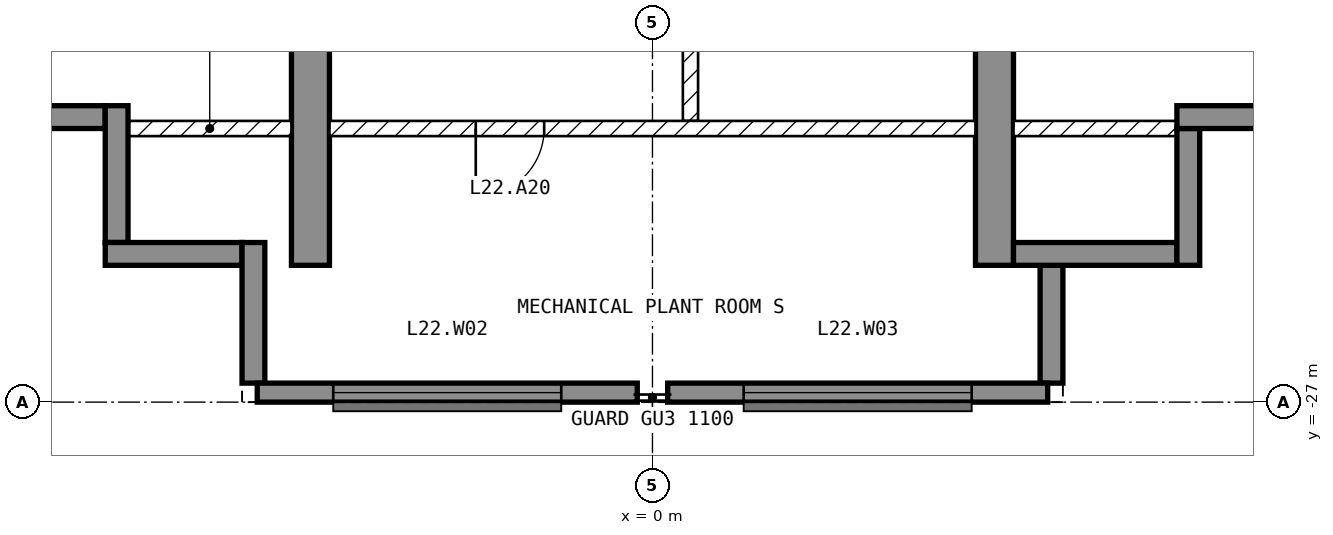
"""IFC4 building model, lengths in metres.
Left out: names, types, materials, properties, quantities, classifications, styles, units other than length and angle.
Written with IfcOpenShell. Run it as: python <this file> out.ifc"""

import sys

from ifc_helpers import new_model, si_unit, direction, frame, frame_2d, origin, place, context, subcontext, project, spatial, polyline, rectangle, outline, extrude, element, fill, save


model = new_model("IFC4")
c1 = context("Model", 3, precision=1e-05, world=origin(), true_north=direction((0.0, 1.0)))
c2 = subcontext(c1, "Body", "Model", "MODEL_VIEW")
j1 = project(units=[si_unit("LENGTHUNIT", "METRE"), si_unit("PLANEANGLEUNIT", "RADIAN")], contexts=[c1])
p1 = place(None, origin())
s1 = spatial("IfcSite", under=j1, at=p1, CompositionType="ELEMENT")
p2 = place(p1, origin())
s2 = spatial("IfcBuilding", under=s1, at=p2, CompositionType="ELEMENT")
p3 = place(p2, frame((0.0, 0.0, 97.9)))
s3 = spatial("IfcBuildingStorey", under=s2, at=p3, CompositionType="ELEMENT", Elevation=97.9)
for number, where, z_axis, x_axis in (
    (1, (-4.75, -25.2, -0.45), (1.0, 0.0, 0.0), (0.0, 1.0, 0.0)),
    (2, (4.25, -25.2, -0.45), (1.0, 0.0, 0.0), (0.0, 1.0, 0.0)),
):
    element("IfcWall", number, at=place(p3, frame(where, z_axis=z_axis, x_axis=x_axis)), inside=s3, PredefinedType="SHEAR", context=c2, shape_type="SweptSolid", body=[
        extrude(outline(polyline([(0.0, 0.0), (3.9, 0.0), (3.9, 2.85), (6.3, 2.85), (6.3, 0.0), (11.7, 0.0), (11.7, 2.85), (14.1, 2.85), (14.1, 0.0), (16.2, 0.0), (16.2, 4.7), (0.0, 4.7), (0.0, 0.0)])), origin(), (0.0, 0.0, 1.0), 0.5),
    ])
p4 = place(p3, frame((-5.2, -26.875, 0.0), z_axis=(0.0, 0.0, 1.0), x_axis=(1.0, 0.0, 0.0)))
e3 = element("IfcWall", 3, at=p4, inside=s3, PredefinedType="SOLIDWALL", context=c2, shape_type="SweptSolid", body=[
    extrude(rectangle(XDim=5.0, YDim=0.25, at=frame_2d((2.5, 0.0))), origin(), (0.0, 0.0, 1.0), 4.25),
])
p5 = place(p4, frame((1.0, 0.0, 1.0)))
e4 = element("IfcOpeningElement", 4, at=p5, cuts=e3, PredefinedType="OPENING", context=c2, shape_type="SweptSolid", body=[
    extrude(rectangle(XDim=3.0, YDim=2.4, at=frame_2d((1.5, 1.2))), frame((0.0, 0.135, 0.0), z_axis=(0.0, -1.0, 0.0), x_axis=(1.0, 0.0, 0.0)), (0.0, 0.0, 1.0), 0.27),
])
p6 = place(p3, frame((0.2, -26.875, 0.0), z_axis=(0.0, 0.0, 1.0), x_axis=(1.0, 0.0, 0.0)))
e5 = element("IfcWall", 5, at=p6, inside=s3, PredefinedType="SOLIDWALL", context=c2, shape_type="SweptSolid", body=[
    extrude(rectangle(XDim=5.0, YDim=0.25, at=frame_2d((2.5, 0.0))), origin(), (0.0, 0.0, 1.0), 4.25),
])
p7 = place(p6, frame((1.0, 0.0, 1.0)))
e6 = element("IfcOpeningElement", 6, at=p7, cuts=e5, PredefinedType="OPENING", context=c2, shape_type="SweptSolid", body=[
    extrude(rectangle(XDim=3.0, YDim=2.4, at=frame_2d((1.5, 1.2))), frame((0.0, 0.135, 0.0), z_axis=(0.0, -1.0, 0.0), x_axis=(1.0, 0.0, 0.0)), (0.0, 0.0, 1.0), 0.27),
])
p8 = place(p3, frame((5.25, -26.75, 0.0), z_axis=(0.0, 0.0, 1.0), x_axis=(0.0, 1.0, 0.0)))
e7 = element("IfcWall", 7, at=p8, inside=s3, PredefinedType="SOLIDWALL", context=c2, shape_type="SweptSolid", body=[
    extrude(rectangle(XDim=1.55, YDim=0.3, at=frame_2d((0.775, 0.0))), origin(), (0.0, 0.0, 1.0), 4.25),
])
p9 = place(p3, frame((4.75, -25.05, 0.0), z_axis=(0.0, 0.0, 1.0), x_axis=(1.0, 0.0, 0.0)))
e8 = element("IfcWall", 8, at=p9, inside=s3, PredefinedType="SOLIDWALL", context=c2, shape_type="SweptSolid", body=[
    extrude(rectangle(XDim=2.15, YDim=0.3, at=frame_2d((1.075, 0.0))), origin(), (0.0, 0.0, 1.0), 4.25),
])
p10 = place(p3, frame((7.05, -25.2, 0.0), z_axis=(0.0, 0.0, 1.0), x_axis=(0.0, 1.0, 0.0)))
e9 = element("IfcWall", 9, at=p10, inside=s3, PredefinedType="SOLIDWALL", context=c2, shape_type="SweptSolid", body=[
    extrude(rectangle(XDim=1.8, YDim=0.3, at=frame_2d((0.9, 0.0))), origin(), (0.0, 0.0, 1.0), 4.25),
])
p11 = place(p3, frame((6.9, -23.25, 0.0), z_axis=(0.0, 0.0, 1.0), x_axis=(1.0, 0.0, 0.0)))
e10 = element("IfcWall", 10, at=p11, inside=s3, PredefinedType="SOLIDWALL", context=c2, shape_type="SweptSolid", body=[
    extrude(rectangle(XDim=1.85, YDim=0.3, at=frame_2d((0.925, 0.0))), origin(), (0.0, 0.0, 1.0), 4.25),
])
p12 = place(p3, frame((-8.75, -23.25, 0.0), z_axis=(0.0, 0.0, 1.0), x_axis=(1.0, 0.0, 0.0)))
e11 = element("IfcWall", 11, at=p12, inside=s3, PredefinedType="SOLIDWALL", context=c2, shape_type="SweptSolid", body=[
    extrude(rectangle(XDim=1.55, YDim=0.3, at=frame_2d((0.775, 0.0))), origin(), (0.0, 0.0, 1.0), 4.25),
])
p13 = place(p3, frame((-7.05, -23.1, 0.0), z_axis=(0.0, 0.0, 1.0), x_axis=(0.0, -1.0, 0.0)))
e12 = element("IfcWall", 12, at=p13, inside=s3, PredefinedType="SOLIDWALL", context=c2, shape_type="SweptSolid", body=[
    extrude(rectangle(XDim=1.8, YDim=0.3, at=frame_2d((0.9, 0.0))), origin(), (0.0, 0.0, 1.0), 4.25),
])
p14 = place(p3, frame((-7.2, -25.05, 0.0), z_axis=(0.0, 0.0, 1.0), x_axis=(1.0, 0.0, 0.0)))
e13 = element("IfcWall", 13, at=p14, inside=s3, PredefinedType="SOLIDWALL", context=c2, shape_type="SweptSolid", body=[
    extrude(rectangle(XDim=1.8, YDim=0.3, at=frame_2d((0.9, 0.0))), origin(), (0.0, 0.0, 1.0), 4.25),
])
p15 = place(p3, frame((-5.25, -24.9, 0.0), z_axis=(0.0, 0.0, 1.0), x_axis=(0.0, -1.0, 0.0)))
e14 = element("IfcWall", 14, at=p15, inside=s3, PredefinedType="SOLIDWALL", context=c2, shape_type="SweptSolid", body=[
    extrude(rectangle(XDim=1.85, YDim=0.3, at=frame_2d((0.925, 0.0))), origin(), (0.0, 0.0, 1.0), 4.25),
])
p16 = place(p3, frame((0.5, -19.0, 0.0), z_axis=(0.0, 0.0, 1.0), x_axis=(0.0, -1.0, 0.0)))
e15 = element("IfcWall", 15, at=p16, inside=s3, PredefinedType="PARTITIONING", context=c2, shape_type="SweptSolid", body=[
    extrude(rectangle(XDim=4.3, YDim=0.2, at=frame_2d((2.15, 0.0))), origin(), (0.0, 0.0, 1.0), 4.25),
])
p17 = place(p16, frame((1.7, 0.0, 0.0)))
e16 = element("IfcOpeningElement", 16, at=p17, cuts=e15, PredefinedType="OPENING", context=c2, shape_type="SweptSolid", body=[
    extrude(rectangle(XDim=0.9, YDim=2.1, at=frame_2d((0.45, 1.05))), frame((0.0, 0.11, 0.0), z_axis=(0.0, -1.0, 0.0), x_axis=(1.0, 0.0, 0.0)), (0.0, 0.0, 1.0), 0.22),
])
p18 = place(p3, frame((4.25, -23.4, 0.0), z_axis=(0.0, 0.0, 1.0), x_axis=(-1.0, 0.0, 0.0)))
e17 = element("IfcWall", 17, at=p18, inside=s3, PredefinedType="PARTITIONING", context=c2, shape_type="SweptSolid", body=[
    extrude(rectangle(XDim=8.5, YDim=0.2, at=frame_2d((4.25, 0.0))), origin(), (0.0, 0.0, 1.0), 4.25),
])
p19 = place(p18, frame((5.675, 0.0, 0.0)))
e18 = element("IfcOpeningElement", 18, at=p19, cuts=e17, PredefinedType="OPENING", context=c2, shape_type="SweptSolid", body=[
    extrude(rectangle(XDim=0.9, YDim=2.1, at=frame_2d((0.45, 1.05))), frame((0.0, 0.11, 0.0), z_axis=(0.0, -1.0, 0.0), x_axis=(1.0, 0.0, 0.0)), (0.0, 0.0, 1.0), 0.22),
])
for number, where, z_axis, x_axis in (
    (19, (6.9, -23.4, 0.0), (0.0, 0.0, 1.0), (-1.0, 0.0, 0.0)),
    (20, (-4.75, -23.4, 0.0), (0.0, 0.0, 1.0), (-1.0, 0.0, 0.0)),
):
    element("IfcWall", number, at=place(p3, frame(where, z_axis=z_axis, x_axis=x_axis)), inside=s3, PredefinedType="PARTITIONING", context=c2, shape_type="SweptSolid", body=[
        extrude(rectangle(XDim=2.15, YDim=0.2, at=frame_2d((1.075, 0.0))), origin(), (0.0, 0.0, 1.0), 4.25),
    ])
p20 = place(p5, origin())
e21 = element("IfcWindow", 21, at=p20, inside=s3, PartitioningType="SINGLE_PANEL", PredefinedType="WINDOW", context=c2, shape_type="SweptSolid", body=[
    extrude(rectangle(XDim=3.0, YDim=2.4, at=frame_2d((1.5, 1.2))), frame((0.0, 0.03, 0.0), z_axis=(0.0, -1.0, 0.0), x_axis=(1.0, 0.0, 0.0)), (0.0, 0.0, 1.0), 0.06),
])
fill(e4, e21)
p21 = place(p7, origin())
e22 = element("IfcWindow", 22, at=p21, inside=s3, PartitioningType="SINGLE_PANEL", PredefinedType="WINDOW", context=c2, shape_type="SweptSolid", body=[
    extrude(rectangle(XDim=3.0, YDim=2.4, at=frame_2d((1.5, 1.2))), frame((0.0, 0.03, 0.0), z_axis=(0.0, -1.0, 0.0), x_axis=(1.0, 0.0, 0.0)), (0.0, 0.0, 1.0), 0.06),
])
fill(e6, e22)
p22 = place(p19, origin())
e23 = element("IfcDoor", 23, at=p22, inside=s3, OperationType="SINGLE_SWING_RIGHT", PredefinedType="DOOR", context=c2, shape_type="SweptSolid", body=[
    extrude(rectangle(XDim=0.9, YDim=2.1, at=frame_2d((0.45, 1.05))), frame((0.0, 0.025, 0.0), z_axis=(0.0, -1.0, 0.0), x_axis=(1.0, 0.0, 0.0)), (0.0, 0.0, 1.0), 0.05),
])
fill(e18, e23)
save(model, sys.argv[1])
